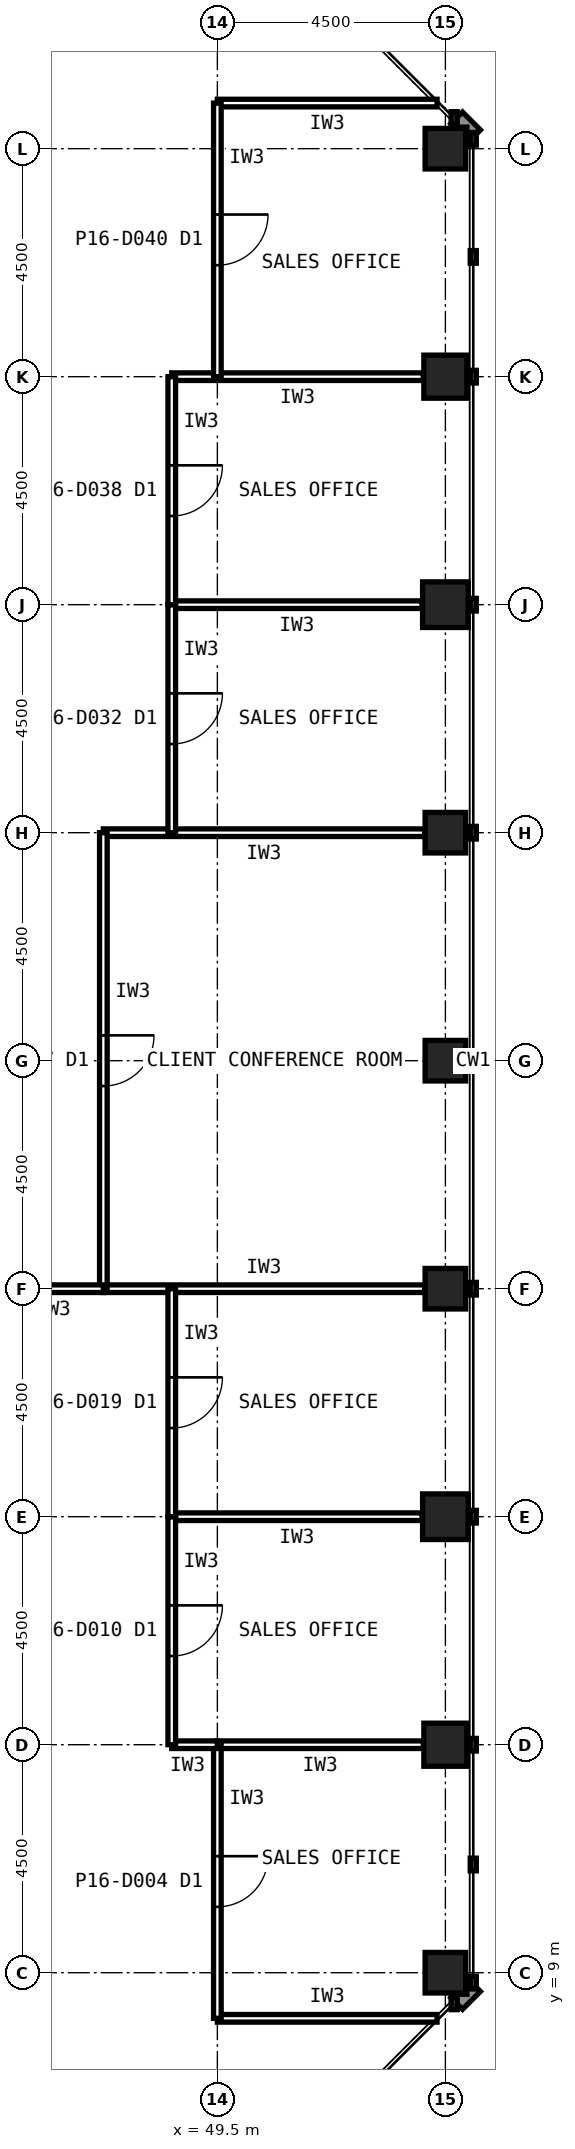
"""IFC4 building model, lengths in metres.
Left out: names, types, materials, properties, quantities, classifications, styles, units other than length and angle.
Written with IfcOpenShell. Run it as: python <this file> out.ifc"""

import sys

from ifc_helpers import new_model, si_unit, direction, frame, frame_2d, origin, origin_2d, place, context, subcontext, project, spatial, rectangle, hollow_rectangle, extrude, element, fill, save


model = new_model("IFC4")
c1 = context("Model", 3, precision=1e-05, world=origin(), true_north=direction((0.0, 1.0)))
c2 = subcontext(c1, "Body", "Model", "MODEL_VIEW")
j1 = project(units=[si_unit("LENGTHUNIT", "METRE"), si_unit("PLANEANGLEUNIT", "RADIAN")], contexts=[c1])
p1 = place(None, origin())
s1 = spatial("IfcSite", under=j1, at=p1, CompositionType="ELEMENT")
p2 = place(p1, origin())
s2 = spatial("IfcBuilding", under=s1, at=p2, CompositionType="ELEMENT")
p3 = place(p2, frame((0.0, 0.0, 71.0)))
s3 = spatial("IfcBuildingStorey", under=s2, at=p3, CompositionType="ELEMENT", Elevation=71.0)
p4 = place(p3, frame((54.0, 9.0, 0.0), z_axis=(0.0, 0.0, 1.0), x_axis=(1.0, 0.0, 0.0)))
e1 = element("IfcColumn", 1, at=p4, inside=s3, PredefinedType="COLUMN", context=c2, shape_type="SweptSolid", body=[
    extrude(hollow_rectangle(XDim=0.8, YDim=0.8, WallThickness=0.045, at=origin_2d()), origin(), (0.0, 0.0, 1.0), 4.2),
])
p5 = place(p3, frame((54.0, 13.5, 0.0), z_axis=(0.0, 0.0, 1.0), x_axis=(1.0, 0.0, 0.0)))
e2 = element("IfcColumn", 2, at=p5, inside=s3, PredefinedType="COLUMN", context=c2, shape_type="SweptSolid", body=[
    extrude(hollow_rectangle(XDim=0.85, YDim=0.85, WallThickness=0.05, at=origin_2d()), origin(), (0.0, 0.0, 1.0), 4.2),
])
p6 = place(p3, frame((54.0, 18.0, 0.0), z_axis=(0.0, 0.0, 1.0), x_axis=(1.0, 0.0, 0.0)))
e3 = element("IfcColumn", 3, at=p6, inside=s3, PredefinedType="COLUMN", context=c2, shape_type="SweptSolid", body=[
    extrude(hollow_rectangle(XDim=0.9, YDim=0.9, WallThickness=0.063, at=origin_2d()), origin(), (0.0, 0.0, 1.0), 4.2),
])
for number, where, z_axis, x_axis in (
    (4, (54.0, 22.5, 0.0), (0.0, 0.0, 1.0), (1.0, 0.0, 0.0)),
    (5, (54.0, 27.0, 0.0), (0.0, 0.0, 1.0), (1.0, 0.0, 0.0)),
    (6, (54.0, 31.5, 0.0), (0.0, 0.0, 1.0), (1.0, 0.0, 0.0)),
):
    element("IfcColumn", number, at=place(p3, frame(where, z_axis=z_axis, x_axis=x_axis)), inside=s3, PredefinedType="COLUMN", context=c2, shape_type="SweptSolid", body=[
        extrude(hollow_rectangle(XDim=0.8, YDim=0.8, WallThickness=0.045, at=origin_2d()), origin(), (0.0, 0.0, 1.0), 4.2),
    ])
p7 = place(p3, frame((54.0, 36.0, 0.0), z_axis=(0.0, 0.0, 1.0), x_axis=(1.0, 0.0, 0.0)))
e7 = element("IfcColumn", 7, at=p7, inside=s3, PredefinedType="COLUMN", context=c2, shape_type="SweptSolid", body=[
    extrude(hollow_rectangle(XDim=0.9, YDim=0.9, WallThickness=0.063, at=origin_2d()), origin(), (0.0, 0.0, 1.0), 4.2),
])
p8 = place(p3, frame((54.0, 40.5, 0.0), z_axis=(0.0, 0.0, 1.0), x_axis=(1.0, 0.0, 0.0)))
e8 = element("IfcColumn", 8, at=p8, inside=s3, PredefinedType="COLUMN", context=c2, shape_type="SweptSolid", body=[
    extrude(hollow_rectangle(XDim=0.85, YDim=0.85, WallThickness=0.05, at=origin_2d()), origin(), (0.0, 0.0, 1.0), 4.2),
])
p9 = place(p3, frame((54.0, 45.0, 0.0), z_axis=(0.0, 0.0, 1.0), x_axis=(1.0, 0.0, 0.0)))
e9 = element("IfcColumn", 9, at=p9, inside=s3, PredefinedType="COLUMN", context=c2, shape_type="SweptSolid", body=[
    extrude(hollow_rectangle(XDim=0.8, YDim=0.8, WallThickness=0.045, at=origin_2d()), origin(), (0.0, 0.0, 1.0), 4.2),
])
for number, where, z_axis, x_axis in (
    (10, (47.25, 22.5, 0.0), (0.0, 0.0, 1.0), (1.0, 0.0, 0.0)),
    (11, (53.59, 31.5, 0.0), (0.0, 0.0, 1.0), (-1.0, 0.0, 0.0)),
):
    element("IfcWall", number, at=place(p3, frame(where, z_axis=z_axis, x_axis=x_axis)), inside=s3, PredefinedType="PARTITIONING", context=c2, shape_type="SweptSolid", body=[
        extrude(rectangle(XDim=6.34, YDim=0.15, at=frame_2d((3.17, 0.0))), origin(), (0.0, 0.0, 1.0), 3.189),
    ])
p10 = place(p3, frame((47.25, 31.5, 0.0), z_axis=(0.0, 0.0, 1.0), x_axis=(0.0, -1.0, 0.0)))
e12 = element("IfcWall", 12, at=p10, inside=s3, PredefinedType="PARTITIONING", context=c2, shape_type="SweptSolid", body=[
    extrude(rectangle(XDim=9.0, YDim=0.15, at=frame_2d((4.5, 0.0))), origin(), (0.0, 0.0, 1.0), 4.04),
])
p11 = place(p10, frame((4.0, 0.0, 0.0)))
e13 = element("IfcOpeningElement", 13, at=p11, cuts=e12, PredefinedType="OPENING", context=c2, shape_type="SweptSolid", body=[
    extrude(rectangle(XDim=1.0, YDim=2.1, at=frame_2d((0.5, 1.05))), frame((0.0, 0.085, 0.0), z_axis=(0.0, -1.0, 0.0), x_axis=(1.0, 0.0, 0.0)), (0.0, 0.0, 1.0), 0.17),
])
p12 = place(p3, frame((49.5, 8.1, 0.0), z_axis=(0.0, 0.0, 1.0), x_axis=(1.0, 0.0, 0.0)))
e14 = element("IfcWall", 14, at=p12, inside=s3, PredefinedType="PARTITIONING", context=c2, shape_type="SweptSolid", body=[
    extrude(rectangle(XDim=4.335, YDim=0.15, at=frame_2d((2.168, 0.0))), origin(), (0.0, 0.0, 1.0), 4.04),
])
p13 = place(p3, frame((53.565, 13.5, 0.0), z_axis=(0.0, 0.0, 1.0), x_axis=(-1.0, 0.0, 0.0)))
e15 = element("IfcWall", 15, at=p13, inside=s3, PredefinedType="PARTITIONING", context=c2, shape_type="SweptSolid", body=[
    extrude(rectangle(XDim=4.065, YDim=0.15, at=frame_2d((2.032, 0.0))), origin(), (0.0, 0.0, 1.0), 3.189),
])
p14 = place(p3, frame((49.5, 13.5, 0.0), z_axis=(0.0, 0.0, 1.0), x_axis=(0.0, -1.0, 0.0)))
e16 = element("IfcWall", 16, at=p14, inside=s3, PredefinedType="PARTITIONING", context=c2, shape_type="SweptSolid", body=[
    extrude(rectangle(XDim=5.4, YDim=0.15, at=frame_2d((2.7, 0.0))), origin(), (0.0, 0.0, 1.0), 4.04),
])
p15 = place(p14, frame((2.2, 0.0, 0.0)))
e17 = element("IfcOpeningElement", 17, at=p15, cuts=e16, PredefinedType="OPENING", context=c2, shape_type="SweptSolid", body=[
    extrude(rectangle(XDim=1.0, YDim=2.1, at=frame_2d((0.5, 1.05))), frame((0.0, 0.085, 0.0), z_axis=(0.0, -1.0, 0.0), x_axis=(1.0, 0.0, 0.0)), (0.0, 0.0, 1.0), 0.17),
])
p16 = place(p3, frame((48.6, 13.5, 0.0), z_axis=(0.0, 0.0, 1.0), x_axis=(1.0, 0.0, 0.0)))
e18 = element("IfcWall", 18, at=p16, inside=s3, PredefinedType="PARTITIONING", context=c2, shape_type="SweptSolid", body=[
    extrude(rectangle(XDim=0.9, YDim=0.15, at=frame_2d((0.45, 0.0))), origin(), (0.0, 0.0, 1.0), 3.189),
])
p17 = place(p3, frame((53.54, 18.0, 0.0), z_axis=(0.0, 0.0, 1.0), x_axis=(-1.0, 0.0, 0.0)))
e19 = element("IfcWall", 19, at=p17, inside=s3, PredefinedType="PARTITIONING", context=c2, shape_type="SweptSolid", body=[
    extrude(rectangle(XDim=4.94, YDim=0.15, at=frame_2d((2.47, 0.0))), origin(), (0.0, 0.0, 1.0), 3.189),
])
p18 = place(p3, frame((48.6, 18.0, 0.0), z_axis=(0.0, 0.0, 1.0), x_axis=(0.0, -1.0, 0.0)))
e20 = element("IfcWall", 20, at=p18, inside=s3, PredefinedType="PARTITIONING", context=c2, shape_type="SweptSolid", body=[
    extrude(rectangle(XDim=4.5, YDim=0.15, at=frame_2d((2.25, 0.0))), origin(), (0.0, 0.0, 1.0), 4.04),
])
p19 = place(p18, frame((1.75, 0.0, 0.0)))
e21 = element("IfcOpeningElement", 21, at=p19, cuts=e20, PredefinedType="OPENING", context=c2, shape_type="SweptSolid", body=[
    extrude(rectangle(XDim=1.0, YDim=2.1, at=frame_2d((0.5, 1.05))), frame((0.0, 0.085, 0.0), z_axis=(0.0, -1.0, 0.0), x_axis=(1.0, 0.0, 0.0)), (0.0, 0.0, 1.0), 0.17),
])
p20 = place(p3, frame((48.6, 22.5, 0.0), z_axis=(0.0, 0.0, 1.0), x_axis=(0.0, -1.0, 0.0)))
e22 = element("IfcWall", 22, at=p20, inside=s3, PredefinedType="PARTITIONING", context=c2, shape_type="SweptSolid", body=[
    extrude(rectangle(XDim=4.5, YDim=0.15, at=frame_2d((2.25, 0.0))), origin(), (0.0, 0.0, 1.0), 4.04),
])
p21 = place(p20, frame((1.75, 0.0, 0.0)))
e23 = element("IfcOpeningElement", 23, at=p21, cuts=e22, PredefinedType="OPENING", context=c2, shape_type="SweptSolid", body=[
    extrude(rectangle(XDim=1.0, YDim=2.1, at=frame_2d((0.5, 1.05))), frame((0.0, 0.085, 0.0), z_axis=(0.0, -1.0, 0.0), x_axis=(1.0, 0.0, 0.0)), (0.0, 0.0, 1.0), 0.17),
])
p22 = place(p3, frame((53.54, 36.0, 0.0), z_axis=(0.0, 0.0, 1.0), x_axis=(-1.0, 0.0, 0.0)))
e24 = element("IfcWall", 24, at=p22, inside=s3, PredefinedType="PARTITIONING", context=c2, shape_type="SweptSolid", body=[
    extrude(rectangle(XDim=4.94, YDim=0.15, at=frame_2d((2.47, 0.0))), origin(), (0.0, 0.0, 1.0), 3.189),
])
p23 = place(p3, frame((48.6, 36.0, 0.0), z_axis=(0.0, 0.0, 1.0), x_axis=(0.0, -1.0, 0.0)))
e25 = element("IfcWall", 25, at=p23, inside=s3, PredefinedType="PARTITIONING", context=c2, shape_type="SweptSolid", body=[
    extrude(rectangle(XDim=4.5, YDim=0.15, at=frame_2d((2.25, 0.0))), origin(), (0.0, 0.0, 1.0), 4.04),
])
p24 = place(p23, frame((1.75, 0.0, 0.0)))
e26 = element("IfcOpeningElement", 26, at=p24, cuts=e25, PredefinedType="OPENING", context=c2, shape_type="SweptSolid", body=[
    extrude(rectangle(XDim=1.0, YDim=2.1, at=frame_2d((0.5, 1.05))), frame((0.0, 0.085, 0.0), z_axis=(0.0, -1.0, 0.0), x_axis=(1.0, 0.0, 0.0)), (0.0, 0.0, 1.0), 0.17),
])
p25 = place(p3, frame((53.565, 40.5, 0.0), z_axis=(0.0, 0.0, 1.0), x_axis=(-1.0, 0.0, 0.0)))
e27 = element("IfcWall", 27, at=p25, inside=s3, PredefinedType="PARTITIONING", context=c2, shape_type="SweptSolid", body=[
    extrude(rectangle(XDim=4.965, YDim=0.15, at=frame_2d((2.482, 0.0))), origin(), (0.0, 0.0, 1.0), 3.189),
])
p26 = place(p3, frame((48.6, 40.5, 0.0), z_axis=(0.0, 0.0, 1.0), x_axis=(0.0, -1.0, 0.0)))
e28 = element("IfcWall", 28, at=p26, inside=s3, PredefinedType="PARTITIONING", context=c2, shape_type="SweptSolid", body=[
    extrude(rectangle(XDim=4.5, YDim=0.15, at=frame_2d((2.25, 0.0))), origin(), (0.0, 0.0, 1.0), 4.04),
])
p27 = place(p26, frame((1.75, 0.0, 0.0)))
e29 = element("IfcOpeningElement", 29, at=p27, cuts=e28, PredefinedType="OPENING", context=c2, shape_type="SweptSolid", body=[
    extrude(rectangle(XDim=1.0, YDim=2.1, at=frame_2d((0.5, 1.05))), frame((0.0, 0.085, 0.0), z_axis=(0.0, -1.0, 0.0), x_axis=(1.0, 0.0, 0.0)), (0.0, 0.0, 1.0), 0.17),
])
p28 = place(p3, frame((53.835, 45.9, 0.0), z_axis=(0.0, 0.0, 1.0), x_axis=(-1.0, 0.0, 0.0)))
e30 = element("IfcWall", 30, at=p28, inside=s3, PredefinedType="PARTITIONING", context=c2, shape_type="SweptSolid", body=[
    extrude(rectangle(XDim=4.335, YDim=0.15, at=frame_2d((2.168, 0.0))), origin(), (0.0, 0.0, 1.0), 4.04),
])
p29 = place(p3, frame((49.5, 45.9, 0.0), z_axis=(0.0, 0.0, 1.0), x_axis=(0.0, -1.0, 0.0)))
e31 = element("IfcWall", 31, at=p29, inside=s3, PredefinedType="PARTITIONING", context=c2, shape_type="SweptSolid", body=[
    extrude(rectangle(XDim=5.4, YDim=0.15, at=frame_2d((2.7, 0.0))), origin(), (0.0, 0.0, 1.0), 4.04),
])
p30 = place(p29, frame((2.2, 0.0, 0.0)))
e32 = element("IfcOpeningElement", 32, at=p30, cuts=e31, PredefinedType="OPENING", context=c2, shape_type="SweptSolid", body=[
    extrude(rectangle(XDim=1.0, YDim=2.1, at=frame_2d((0.5, 1.05))), frame((0.0, 0.085, 0.0), z_axis=(0.0, -1.0, 0.0), x_axis=(1.0, 0.0, 0.0)), (0.0, 0.0, 1.0), 0.17),
])
p31 = place(p3, frame((47.25, 22.5, 0.0), z_axis=(0.0, 0.0, 1.0), x_axis=(-1.0, 0.0, 0.0)))
e33 = element("IfcWall", 33, at=p31, inside=s3, PredefinedType="PARTITIONING", context=c2, shape_type="SweptSolid", body=[
    extrude(rectangle(XDim=4.95, YDim=0.15, at=frame_2d((2.475, 0.0))), origin(), (0.0, 0.0, 1.0), 3.189),
])
p32 = place(p31, frame((1.975, 0.0, 0.0)))
e34 = element("IfcOpeningElement", 34, at=p32, cuts=e33, PredefinedType="OPENING", context=c2, shape_type="SweptSolid", body=[
    extrude(rectangle(XDim=1.0, YDim=2.1, at=frame_2d((0.5, 1.05))), frame((0.0, 0.085, 0.0), z_axis=(0.0, -1.0, 0.0), x_axis=(1.0, 0.0, 0.0)), (0.0, 0.0, 1.0), 0.17),
])
p33 = place(p11, origin())
e35 = element("IfcDoor", 35, at=p33, inside=s3, OperationType="SINGLE_SWING_LEFT", PredefinedType="DOOR", context=c2, shape_type="SweptSolid", body=[
    extrude(rectangle(XDim=1.0, YDim=2.1, at=frame_2d((0.5, 1.05))), frame((0.0, 0.025, 0.0), z_axis=(0.0, -1.0, 0.0), x_axis=(1.0, 0.0, 0.0)), (0.0, 0.0, 1.0), 0.05),
])
fill(e13, e35)
p34 = place(p15, origin())
e36 = element("IfcDoor", 36, at=p34, inside=s3, OperationType="SINGLE_SWING_LEFT", PredefinedType="DOOR", context=c2, shape_type="SweptSolid", body=[
    extrude(rectangle(XDim=1.0, YDim=2.1, at=frame_2d((0.5, 1.05))), frame((0.0, 0.025, 0.0), z_axis=(0.0, -1.0, 0.0), x_axis=(1.0, 0.0, 0.0)), (0.0, 0.0, 1.0), 0.05),
])
fill(e17, e36)
p35 = place(p19, origin())
e37 = element("IfcDoor", 37, at=p35, inside=s3, OperationType="SINGLE_SWING_LEFT", PredefinedType="DOOR", context=c2, shape_type="SweptSolid", body=[
    extrude(rectangle(XDim=1.0, YDim=2.1, at=frame_2d((0.5, 1.05))), frame((0.0, 0.025, 0.0), z_axis=(0.0, -1.0, 0.0), x_axis=(1.0, 0.0, 0.0)), (0.0, 0.0, 1.0), 0.05),
])
fill(e21, e37)
p36 = place(p21, origin())
e38 = element("IfcDoor", 38, at=p36, inside=s3, OperationType="SINGLE_SWING_LEFT", PredefinedType="DOOR", context=c2, shape_type="SweptSolid", body=[
    extrude(rectangle(XDim=1.0, YDim=2.1, at=frame_2d((0.5, 1.05))), frame((0.0, 0.025, 0.0), z_axis=(0.0, -1.0, 0.0), x_axis=(1.0, 0.0, 0.0)), (0.0, 0.0, 1.0), 0.05),
])
fill(e23, e38)
p37 = place(p24, origin())
e39 = element("IfcDoor", 39, at=p37, inside=s3, OperationType="SINGLE_SWING_LEFT", PredefinedType="DOOR", context=c2, shape_type="SweptSolid", body=[
    extrude(rectangle(XDim=1.0, YDim=2.1, at=frame_2d((0.5, 1.05))), frame((0.0, 0.025, 0.0), z_axis=(0.0, -1.0, 0.0), x_axis=(1.0, 0.0, 0.0)), (0.0, 0.0, 1.0), 0.05),
])
fill(e26, e39)
p38 = place(p27, origin())
e40 = element("IfcDoor", 40, at=p38, inside=s3, OperationType="SINGLE_SWING_LEFT", PredefinedType="DOOR", context=c2, shape_type="SweptSolid", body=[
    extrude(rectangle(XDim=1.0, YDim=2.1, at=frame_2d((0.5, 1.05))), frame((0.0, 0.025, 0.0), z_axis=(0.0, -1.0, 0.0), x_axis=(1.0, 0.0, 0.0)), (0.0, 0.0, 1.0), 0.05),
])
fill(e29, e40)
p39 = place(p30, origin())
e41 = element("IfcDoor", 41, at=p39, inside=s3, OperationType="SINGLE_SWING_LEFT", PredefinedType="DOOR", context=c2, shape_type="SweptSolid", body=[
    extrude(rectangle(XDim=1.0, YDim=2.1, at=frame_2d((0.5, 1.05))), frame((0.0, 0.025, 0.0), z_axis=(0.0, -1.0, 0.0), x_axis=(1.0, 0.0, 0.0)), (0.0, 0.0, 1.0), 0.05),
])
fill(e32, e41)
save(model, sys.argv[1])
